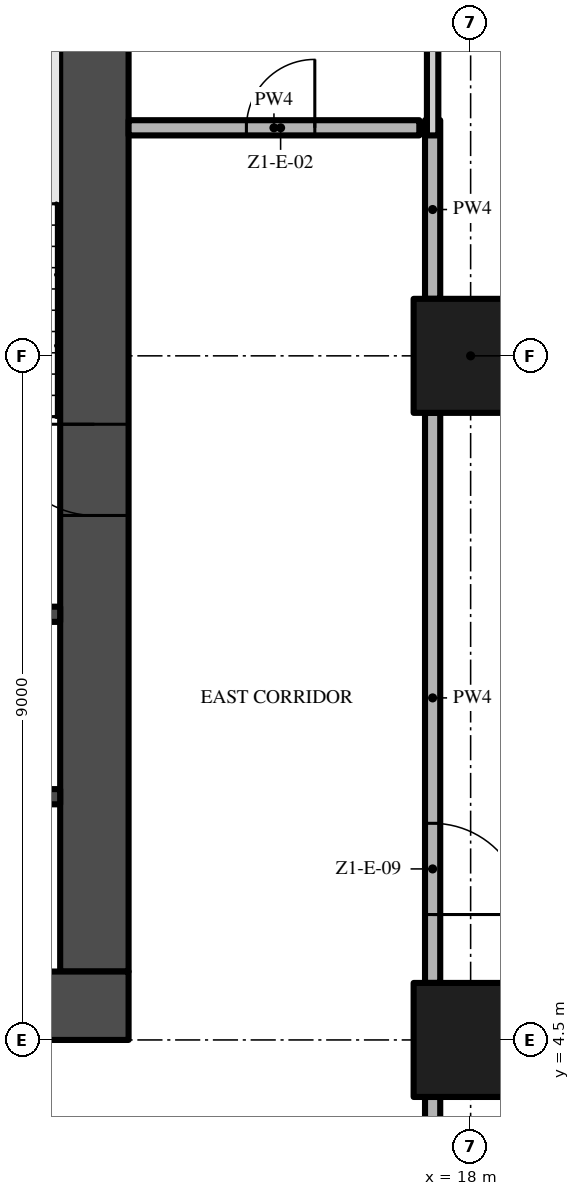
"""IFC4 building model, lengths in metres.
Left out: names, types, materials, properties, quantities, classifications, styles, units other than length and angle.
Written with IfcOpenShell. Run it as: python <this file> out.ifc"""

import sys

from ifc_helpers import new_model, si_unit, direction, frame, frame_2d, origin, origin_2d, place, context, subcontext, project, spatial, rectangle, extrude, element, fill, save


model = new_model("IFC4")
c1 = context("Model", 3, precision=1e-05, world=origin(), true_north=direction((0.0, 1.0)))
c2 = subcontext(c1, "Body", "Model", "MODEL_VIEW")
j1 = project(units=[si_unit("LENGTHUNIT", "METRE"), si_unit("PLANEANGLEUNIT", "RADIAN")], contexts=[c1])
p1 = place(None, origin())
s1 = spatial("IfcSite", under=j1, at=p1, CompositionType="ELEMENT")
p2 = place(p1, origin())
s2 = spatial("IfcBuilding", under=s1, at=p2, CompositionType="ELEMENT")
p3 = place(p2, frame((0.0, 0.0, 56.8)))
s3 = spatial("IfcBuildingStorey", under=s2, at=p3, CompositionType="ELEMENT", Elevation=56.8)
p4 = place(p3, frame((-13.5, 4.95, -0.3), z_axis=(0.0, 0.0, 1.0), x_axis=(1.0, 0.0, 0.0)))
e1 = element("IfcWall", 1, at=p4, inside=s3, PredefinedType="SHEAR", context=c2, shape_type="SweptSolid", body=[
    extrude(rectangle(XDim=27.0, YDim=0.9, at=frame_2d((13.5, 0.0))), origin(), (0.0, 0.0, 1.0), 3.8),
])
p5 = place(p4, frame((12.0, 0.0, 0.3)))
e2 = element("IfcOpeningElement", 2, at=p5, cuts=e1, PredefinedType="OPENING", context=c2, shape_type="SweptSolid", body=[
    extrude(rectangle(XDim=3.0, YDim=2.4, at=frame_2d((1.5, 1.2))), frame((0.0, 0.46, 0.0), z_axis=(0.0, -1.0, 0.0), x_axis=(1.0, 0.0, 0.0)), (0.0, 0.0, 1.0), 0.92),
])
p6 = place(p4, frame((4.9, 0.0, 0.3)))
e3 = element("IfcOpeningElement", 3, at=p6, cuts=e1, PredefinedType="OPENING", context=c2, shape_type="SweptSolid", body=[
    extrude(rectangle(XDim=1.2, YDim=2.2, at=frame_2d((0.6, 1.1))), frame((0.0, 0.46, 0.0), z_axis=(0.0, -1.0, 0.0), x_axis=(1.0, 0.0, 0.0)), (0.0, 0.0, 1.0), 0.92),
])
p7 = place(p4, frame((20.75, 0.0, 0.3)))
e4 = element("IfcOpeningElement", 4, at=p7, cuts=e1, PredefinedType="OPENING", context=c2, shape_type="SweptSolid", body=[
    extrude(rectangle(XDim=1.5, YDim=2.2, at=frame_2d((0.75, 1.1))), frame((0.0, 0.46, 0.0), z_axis=(0.0, -1.0, 0.0), x_axis=(1.0, 0.0, 0.0)), (0.0, 0.0, 1.0), 0.92),
])
p8 = place(p4, frame((17.4, 0.0, 0.3)))
e5 = element("IfcOpeningElement", 5, at=p8, cuts=e1, PredefinedType="OPENING", context=c2, shape_type="SweptSolid", body=[
    extrude(rectangle(XDim=1.2, YDim=2.2, at=frame_2d((0.6, 1.1))), frame((0.0, 0.46, 0.0), z_axis=(0.0, -1.0, 0.0), x_axis=(1.0, 0.0, 0.0)), (0.0, 0.0, 1.0), 0.92),
])
p9 = place(p3, frame((13.05, 5.4, -0.3), z_axis=(0.0, 0.0, 1.0), x_axis=(0.0, 1.0, 0.0)))
e6 = element("IfcWall", 6, at=p9, inside=s3, PredefinedType="SHEAR", context=c2, shape_type="SweptSolid", body=[
    extrude(rectangle(XDim=16.2, YDim=0.9, at=frame_2d((8.1, 0.0))), origin(), (0.0, 0.0, 1.0), 3.8),
])
p10 = place(p9, frame((6.0, 0.0, 0.3)))
e7 = element("IfcOpeningElement", 7, at=p10, cuts=e6, PredefinedType="OPENING", context=c2, shape_type="SweptSolid", body=[
    extrude(rectangle(XDim=1.2, YDim=2.2, at=frame_2d((0.6, 1.1))), frame((0.0, 0.46, 0.0), z_axis=(0.0, -1.0, 0.0), x_axis=(1.0, 0.0, 0.0)), (0.0, 0.0, 1.0), 0.92),
])
for number, where, z_axis, x_axis in (
    (8, (18.0, 13.5, 0.0), (0.0, 0.0, 1.0), (1.0, 0.0, 0.0)),
    (9, (18.0, 4.5, 0.0), (0.0, 0.0, 1.0), (1.0, 0.0, 0.0)),
):
    element("IfcColumn", number, at=place(p3, frame(where, z_axis=z_axis, x_axis=x_axis)), inside=s3, PredefinedType="COLUMN", context=c2, shape_type="SweptSolid", body=[
        extrude(rectangle(XDim=1.5, YDim=1.5, at=origin_2d()), origin(), (0.0, 0.0, 1.0), 3.5),
    ])
for number, where, z_axis, x_axis in (
    (10, (9.65, 7.7, 0.0), (0.0, 0.0, 1.0), (1.0, 0.0, 0.0)),
    (11, (9.65, 10.1, 0.0), (0.0, 0.0, 1.0), (1.0, 0.0, 0.0)),
):
    element("IfcWall", number, at=place(p3, frame(where, z_axis=z_axis, x_axis=x_axis)), inside=s3, PredefinedType="SHEAR", context=c2, shape_type="SweptSolid", body=[
        extrude(rectangle(XDim=2.95, YDim=0.2, at=frame_2d((1.475, 0.0))), origin(), (0.0, 0.0, 1.0), 3.5),
    ])
p11 = place(p3, frame((13.5, 16.5, 0.0), z_axis=(0.0, 0.0, 1.0), x_axis=(1.0, 0.0, 0.0)))
e12 = element("IfcWall", 12, at=p11, inside=s3, PredefinedType="PARTITIONING", context=c2, shape_type="SweptSolid", body=[
    extrude(rectangle(XDim=3.825, YDim=0.2, at=frame_2d((1.913, 0.0))), origin(), (0.0, 0.0, 1.0), 3.5),
])
p12 = place(p11, frame((1.55, 0.0, 0.0)))
e13 = element("IfcOpeningElement", 13, at=p12, cuts=e12, PredefinedType="OPENING", context=c2, shape_type="SweptSolid", body=[
    extrude(rectangle(XDim=0.9, YDim=2.1, at=frame_2d((0.45, 1.05))), frame((0.0, 0.11, 0.0), z_axis=(0.0, -1.0, 0.0), x_axis=(1.0, 0.0, 0.0)), (0.0, 0.0, 1.0), 0.22),
])
p13 = place(p3, frame((17.5, -0.2, 0.0), z_axis=(0.0, 0.0, 1.0), x_axis=(0.0, 1.0, 0.0)))
e14 = element("IfcWall", 14, at=p13, inside=s3, PredefinedType="PARTITIONING", context=c2, shape_type="SweptSolid", body=[
    extrude(rectangle(XDim=3.95, YDim=0.2, at=frame_2d((1.975, 0.0))), origin(), (0.0, 0.0, 1.0), 3.5),
])
p14 = place(p3, frame((17.5, 12.75, 0.0), z_axis=(0.0, 0.0, 1.0), x_axis=(0.0, -1.0, 0.0)))
e15 = element("IfcWall", 15, at=p14, inside=s3, PredefinedType="PARTITIONING", context=c2, shape_type="SweptSolid", body=[
    extrude(rectangle(XDim=7.5, YDim=0.2, at=frame_2d((3.75, 0.0))), origin(), (0.0, 0.0, 1.0), 3.5),
])
p15 = place(p14, frame((5.4, 0.0, 0.0)))
e16 = element("IfcOpeningElement", 16, at=p15, cuts=e15, PredefinedType="OPENING", context=c2, shape_type="SweptSolid", body=[
    extrude(rectangle(XDim=1.2, YDim=2.4, at=frame_2d((0.6, 1.2))), frame((0.0, 0.11, 0.0), z_axis=(0.0, -1.0, 0.0), x_axis=(1.0, 0.0, 0.0)), (0.0, 0.0, 1.0), 0.22),
])
p16 = place(p3, frame((17.5, 14.25, 0.0), z_axis=(0.0, 0.0, 1.0), x_axis=(0.0, 1.0, 0.0)))
e17 = element("IfcWall", 17, at=p16, inside=s3, PredefinedType="PARTITIONING", context=c2, shape_type="SweptSolid", body=[
    extrude(rectangle(XDim=2.35, YDim=0.2, at=frame_2d((1.175, 0.0))), origin(), (0.0, 0.0, 1.0), 3.5),
])
p17 = place(p3, frame((17.5, 16.4, 0.0), z_axis=(0.0, 0.0, 1.0), x_axis=(0.0, 1.0, 0.0)))
e18 = element("IfcWall", 18, at=p17, inside=s3, PredefinedType="PARTITIONING", context=c2, shape_type="SweptSolid", body=[
    extrude(rectangle(XDim=4.7, YDim=0.15, at=frame_2d((2.35, 0.0))), origin(), (0.0, 0.0, 1.0), 3.5),
])
p18 = place(p10, frame((1.2, 0.0, 0.0), z_axis=(0.0, 0.0, 1.0), x_axis=(-1.0, 0.0, 0.0)))
e19 = element("IfcDoor", 19, at=p18, inside=s3, OperationType="SINGLE_SWING_LEFT", PredefinedType="DOOR", context=c2, shape_type="SweptSolid", body=[
    extrude(rectangle(XDim=1.2, YDim=2.2, at=frame_2d((0.6, 1.1))), frame((0.0, 0.025, 0.0), z_axis=(0.0, -1.0, 0.0), x_axis=(1.0, 0.0, 0.0)), (0.0, 0.0, 1.0), 0.05),
])
fill(e7, e19)
p19 = place(p12, origin())
e20 = element("IfcDoor", 20, at=p19, inside=s3, OperationType="SINGLE_SWING_RIGHT", PredefinedType="DOOR", context=c2, shape_type="SweptSolid", body=[
    extrude(rectangle(XDim=0.9, YDim=2.1, at=frame_2d((0.45, 1.05))), frame((0.0, 0.025, 0.0), z_axis=(0.0, -1.0, 0.0), x_axis=(1.0, 0.0, 0.0)), (0.0, 0.0, 1.0), 0.05),
])
fill(e13, e20)
p20 = place(p15, origin())
e21 = element("IfcDoor", 21, at=p20, inside=s3, OperationType="SINGLE_SWING_RIGHT", PredefinedType="DOOR", context=c2, shape_type="SweptSolid", body=[
    extrude(rectangle(XDim=1.2, YDim=2.4, at=frame_2d((0.6, 1.2))), frame((0.0, 0.025, 0.0), z_axis=(0.0, -1.0, 0.0), x_axis=(1.0, 0.0, 0.0)), (0.0, 0.0, 1.0), 0.05),
])
fill(e16, e21)
save(model, sys.argv[1])
